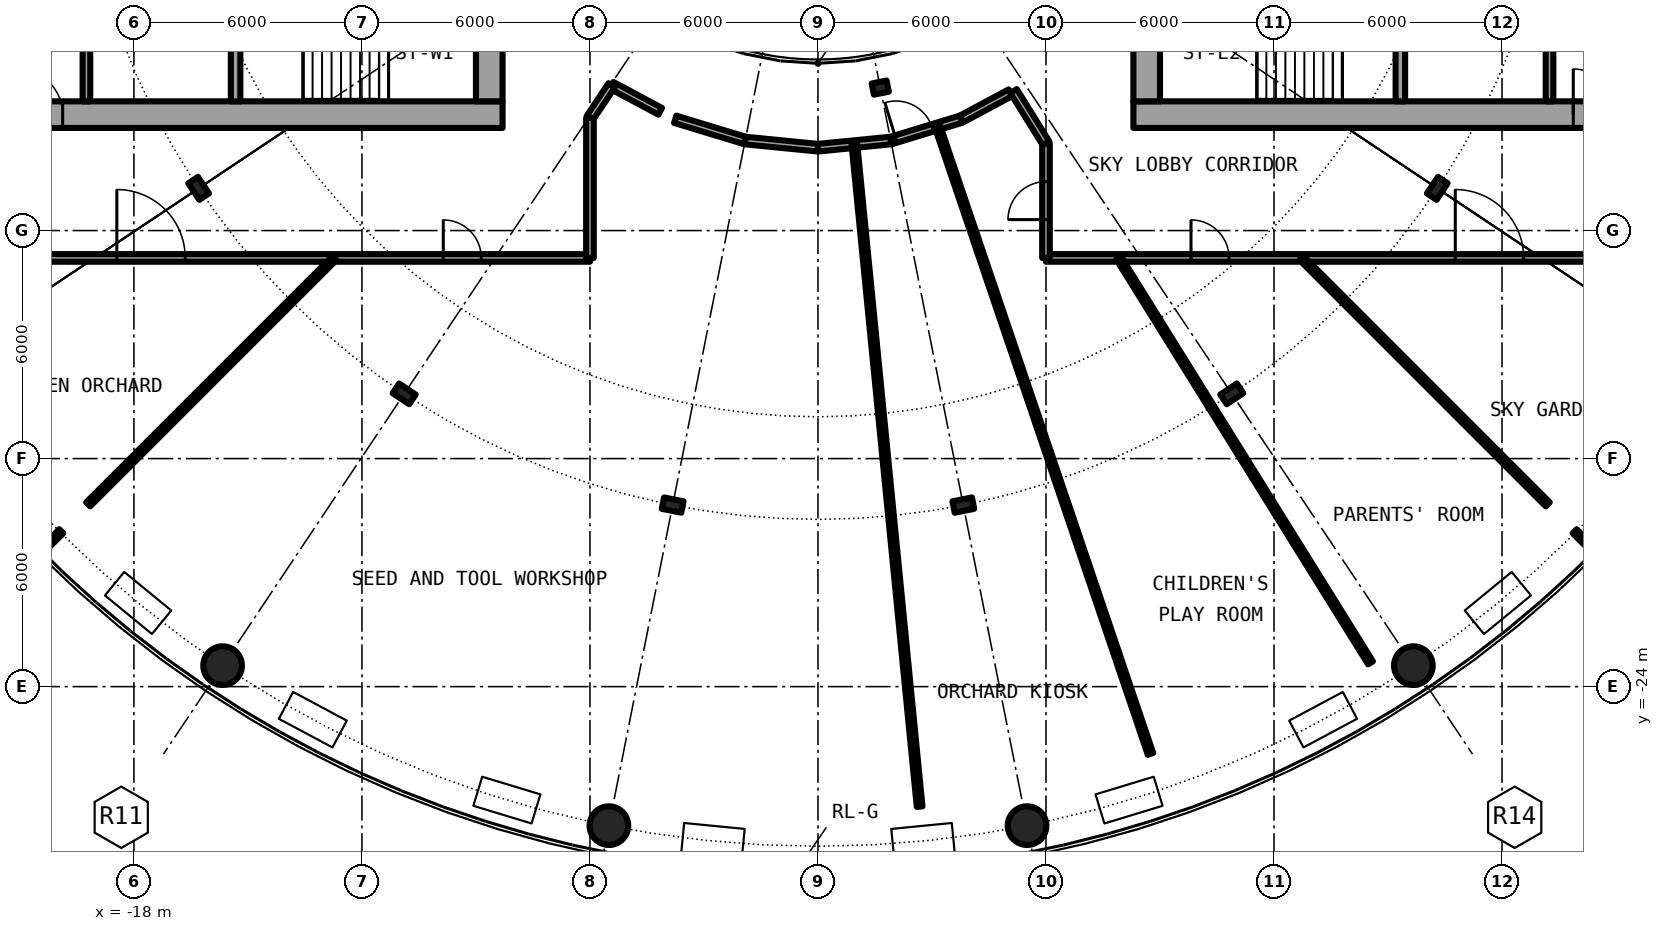
"""IFC4 building model, lengths in metres.
Left out: names, types, materials, properties, quantities, classifications, styles, units other than length and angle.
Written with IfcOpenShell. Run it as: python <this file> out.ifc"""

import sys

from ifc_helpers import new_model, si_unit, direction, frame, frame_2d, origin, origin_2d, place, context, subcontext, project, spatial, rectangle, hollow_circle, i_section, extrude, element, fill, save


model = new_model("IFC4")
c1 = context("Model", 3, precision=1e-05, world=origin(), true_north=direction((0.0, 1.0)))
c2 = subcontext(c1, "Body", "Model", "MODEL_VIEW")
j1 = project(units=[si_unit("LENGTHUNIT", "METRE"), si_unit("PLANEANGLEUNIT", "RADIAN")], contexts=[c1])
p1 = place(None, origin())
s1 = spatial("IfcSite", under=j1, at=p1, CompositionType="ELEMENT")
p2 = place(p1, origin())
s2 = spatial("IfcBuilding", under=s1, at=p2, CompositionType="ELEMENT")
p3 = place(p2, frame((0.0, 0.0, 97.15)))
s3 = spatial("IfcBuildingStorey", under=s2, at=p3, CompositionType="ELEMENT", Elevation=97.15)
for number, where, z_axis, x_axis in (
    (1, (-15.667, -23.448, 0.0), (0.0, 0.0, 1.0), (1.0, 0.0, 0.0)),
    (2, (-5.501, -27.658, 0.0), (0.0, 0.0, 1.0), (1.0, 0.0, 0.0)),
    (3, (5.501, -27.658, 0.0), (0.0, 0.0, 1.0), (1.0, 0.0, 0.0)),
    (4, (15.667, -23.448, 0.0), (0.0, 0.0, 1.0), (1.0, 0.0, 0.0)),
):
    element("IfcColumn", number, at=place(p3, frame(where, z_axis=z_axis, x_axis=x_axis)), inside=s3, PredefinedType="COLUMN", context=c2, shape_type="SweptSolid", body=[
        extrude(hollow_circle(Radius=0.508, WallThickness=0.04, at=origin_2d()), origin(), (0.0, 0.0, 1.0), 6.1),
    ])
for number, where, z_axis, x_axis in (
    (5, (-16.297, -10.889, 0.0), (0.0, 0.0, 1.0), (-0.831, -0.556, 0.0)),
    (6, (-10.889, -16.297, 0.0), (0.0, 0.0, 1.0), (-0.556, -0.831, 0.0)),
    (7, (-3.824, -19.223, 0.0), (0.0, 0.0, 1.0), (-0.195, -0.981, 0.0)),
    (8, (3.824, -19.223, 0.0), (0.0, 0.0, 1.0), (0.195, -0.981, 0.0)),
    (9, (10.889, -16.297, 0.0), (0.0, 0.0, 1.0), (0.556, -0.831, 0.0)),
    (10, (16.297, -10.889, 0.0), (0.0, 0.0, 1.0), (0.831, -0.556, 0.0)),
):
    element("IfcColumn", number, at=place(p3, frame(where, z_axis=z_axis, x_axis=x_axis)), inside=s3, PredefinedType="COLUMN", context=c2, shape_type="SweptSolid", body=[
        extrude(i_section(OverallWidth=0.306, OverallDepth=0.524, WebThickness=0.021, FlangeThickness=0.04, FilletRadius=0.027, at=origin_2d()), origin(), (0.0, 0.0, 1.0), 6.1),
    ])
p4 = place(p3, frame((1.639, -8.239, 0.0), z_axis=(0.0, 0.0, 1.0), x_axis=(0.195090322016, -0.980785280403, 0.0)))
e11 = element("IfcColumn", 11, at=p4, inside=s3, PredefinedType="COLUMN", context=c2, shape_type="SweptSolid", body=[
    extrude(i_section(OverallWidth=0.3, OverallDepth=0.4, WebThickness=0.013, FlangeThickness=0.024, FilletRadius=0.027, at=origin_2d()), origin(), (0.0, 0.0, 1.0), 6.1),
])
p5 = place(p3, frame((8.3, -8.95, 0.0), z_axis=(0.0, 0.0, 1.0), x_axis=(1.0, 0.0, 0.0)))
e12 = element("IfcWall", 12, at=p5, inside=s3, PredefinedType="SHEAR", context=c2, shape_type="SweptSolid", body=[
    extrude(rectangle(XDim=14.0, YDim=0.7, at=frame_2d((7.0, 0.0))), origin(), (0.0, 0.0, 1.0), 6.1),
])
p6 = place(p5, frame((11.575, 0.0, 0.0)))
e13 = element("IfcOpeningElement", 13, at=p6, cuts=e12, PredefinedType="OPENING", context=c2, shape_type="SweptSolid", body=[
    extrude(rectangle(XDim=1.2, YDim=2.3, at=frame_2d((0.6, 1.15))), frame((0.0, 0.36, 0.0), z_axis=(0.0, -1.0, 0.0), x_axis=(1.0, 0.0, 0.0)), (0.0, 0.0, 1.0), 0.72),
])
p7 = place(p3, frame((8.65, -8.6, 0.0), z_axis=(0.0, 0.0, 1.0), x_axis=(0.0, 1.0, 0.0)))
e14 = element("IfcWall", 14, at=p7, inside=s3, PredefinedType="SHEAR", context=c2, shape_type="SweptSolid", body=[
    extrude(rectangle(XDim=17.2, YDim=0.7, at=frame_2d((8.6, 0.0))), origin(), (0.0, 0.0, 1.0), 6.1),
])
p8 = place(p7, frame((7.4, 0.0, 0.1)))
e15 = element("IfcOpeningElement", 15, at=p8, cuts=e14, PredefinedType="OPENING", context=c2, shape_type="SweptSolid", body=[
    extrude(rectangle(XDim=2.4, YDim=2.2, at=frame_2d((1.2, 1.1))), frame((0.0, 0.36, 0.0), z_axis=(0.0, -1.0, 0.0), x_axis=(1.0, 0.0, 0.0)), (0.0, 0.0, 1.0), 0.72),
])
p9 = place(p3, frame((15.325, -8.6, 0.0), z_axis=(0.0, 0.0, 1.0), x_axis=(0.0, 1.0, 0.0)))
e16 = element("IfcWall", 16, at=p9, inside=s3, PredefinedType="SHEAR", context=c2, shape_type="SweptSolid", body=[
    extrude(rectangle(XDim=3.95, YDim=0.25, at=frame_2d((1.975, 0.0))), origin(), (0.0, 0.0, 1.0), 6.1),
])
p10 = place(p9, frame((2.025, 0.0, 0.0)))
e17 = element("IfcOpeningElement", 17, at=p10, cuts=e16, PredefinedType="OPENING", context=c2, shape_type="SweptSolid", body=[
    extrude(rectangle(XDim=1.2, YDim=2.3, at=frame_2d((0.6, 1.15))), frame((0.0, 0.135, 0.0), z_axis=(0.0, -1.0, 0.0), x_axis=(1.0, 0.0, 0.0)), (0.0, 0.0, 1.0), 0.27),
])
p11 = place(p3, frame((19.25, -8.6, 0.0), z_axis=(0.0, 0.0, 1.0), x_axis=(0.0, 1.0, 0.0)))
e18 = element("IfcWall", 18, at=p11, inside=s3, PredefinedType="SOLIDWALL", context=c2, shape_type="SweptSolid", body=[
    extrude(rectangle(XDim=7.025, YDim=0.2, at=frame_2d((3.513, 0.0))), origin(), (0.0, 0.0, 1.0), 5.7),
])
p12 = place(p11, frame((2.35, 0.0, 0.0)))
e19 = element("IfcOpeningElement", 19, at=p12, cuts=e18, PredefinedType="OPENING", context=c2, shape_type="SweptSolid", body=[
    extrude(rectangle(XDim=1.1, YDim=2.3, at=frame_2d((0.55, 1.15))), frame((0.0, 0.11, 0.0), z_axis=(0.0, -1.0, 0.0), x_axis=(1.0, 0.0, 0.0)), (0.0, 0.0, 1.0), 0.22),
])
p13 = place(p3, frame((-22.3, -8.95, 0.0), z_axis=(0.0, 0.0, 1.0), x_axis=(1.0, 0.0, 0.0)))
e20 = element("IfcWall", 20, at=p13, inside=s3, PredefinedType="SHEAR", context=c2, shape_type="SweptSolid", body=[
    extrude(rectangle(XDim=14.0, YDim=0.7, at=frame_2d((7.0, 0.0))), origin(), (0.0, 0.0, 1.0), 6.1),
])
p14 = place(p13, frame((1.225, 0.0, 0.0)))
e21 = element("IfcOpeningElement", 21, at=p14, cuts=e20, PredefinedType="OPENING", context=c2, shape_type="SweptSolid", body=[
    extrude(rectangle(XDim=1.2, YDim=2.3, at=frame_2d((0.6, 1.15))), frame((0.0, 0.36, 0.0), z_axis=(0.0, -1.0, 0.0), x_axis=(1.0, 0.0, 0.0)), (0.0, 0.0, 1.0), 0.72),
])
p15 = place(p3, frame((-8.65, 8.6, 0.0), z_axis=(0.0, 0.0, 1.0), x_axis=(0.0, -1.0, 0.0)))
e22 = element("IfcWall", 22, at=p15, inside=s3, PredefinedType="SHEAR", context=c2, shape_type="SweptSolid", body=[
    extrude(rectangle(XDim=17.2, YDim=0.7, at=frame_2d((8.6, 0.0))), origin(), (0.0, 0.0, 1.0), 6.1),
])
p16 = place(p15, frame((7.4, 0.0, 0.1)))
e23 = element("IfcOpeningElement", 23, at=p16, cuts=e22, PredefinedType="OPENING", context=c2, shape_type="SweptSolid", body=[
    extrude(rectangle(XDim=2.4, YDim=2.2, at=frame_2d((1.2, 1.1))), frame((0.0, 0.36, 0.0), z_axis=(0.0, -1.0, 0.0), x_axis=(1.0, 0.0, 0.0)), (0.0, 0.0, 1.0), 0.72),
])
p17 = place(p3, frame((-15.325, -4.65, 0.0), z_axis=(0.0, 0.0, 1.0), x_axis=(0.0, -1.0, 0.0)))
e24 = element("IfcWall", 24, at=p17, inside=s3, PredefinedType="SHEAR", context=c2, shape_type="SweptSolid", body=[
    extrude(rectangle(XDim=3.95, YDim=0.25, at=frame_2d((1.975, 0.0))), origin(), (0.0, 0.0, 1.0), 6.1),
])
p18 = place(p17, frame((1.375, 0.0, 0.0)))
e25 = element("IfcOpeningElement", 25, at=p18, cuts=e24, PredefinedType="OPENING", context=c2, shape_type="SweptSolid", body=[
    extrude(rectangle(XDim=1.2, YDim=2.3, at=frame_2d((0.6, 1.15))), frame((0.0, 0.135, 0.0), z_axis=(0.0, -1.0, 0.0), x_axis=(1.0, 0.0, 0.0)), (0.0, 0.0, 1.0), 0.27),
])
p19 = place(p3, frame((-19.25, -1.575, 0.0), z_axis=(0.0, 0.0, 1.0), x_axis=(0.0, -1.0, 0.0)))
e26 = element("IfcWall", 26, at=p19, inside=s3, PredefinedType="SOLIDWALL", context=c2, shape_type="SweptSolid", body=[
    extrude(rectangle(XDim=7.025, YDim=0.2, at=frame_2d((3.513, 0.0))), origin(), (0.0, 0.0, 1.0), 5.7),
])
p20 = place(p19, frame((4.475, 0.0, 0.0)))
e27 = element("IfcOpeningElement", 27, at=p20, cuts=e26, PredefinedType="OPENING", context=c2, shape_type="SweptSolid", body=[
    extrude(rectangle(XDim=1.1, YDim=2.3, at=frame_2d((0.55, 1.15))), frame((0.0, 0.11, 0.0), z_axis=(0.0, -1.0, 0.0), x_axis=(1.0, 0.0, 0.0)), (0.0, 0.0, 1.0), 0.22),
])
p21 = place(p3, frame((-21.9, -12.72, 0.0), z_axis=(0.0, 0.0, 1.0), x_axis=(1.0, 0.0, 0.0)))
e28 = element("IfcWall", 28, at=p21, inside=s3, PredefinedType="PARTITIONING", context=c2, shape_type="SweptSolid", body=[
    extrude(rectangle(XDim=15.9, YDim=0.2, at=frame_2d((7.95, 0.0))), origin(), (0.0, 0.0, 1.0), 5.7),
])
p22 = place(p21, frame((12.04, 0.0, 0.0)))
e29 = element("IfcOpeningElement", 29, at=p22, cuts=e28, PredefinedType="OPENING", context=c2, shape_type="SweptSolid", body=[
    extrude(rectangle(XDim=1.0, YDim=2.3, at=frame_2d((0.5, 1.15))), frame((0.0, 0.11, 0.0), z_axis=(0.0, -1.0, 0.0), x_axis=(1.0, 0.0, 0.0)), (0.0, 0.0, 1.0), 0.22),
])
p23 = place(p21, frame((3.45, 0.0, 0.0)))
e30 = element("IfcOpeningElement", 30, at=p23, cuts=e28, PredefinedType="OPENING", context=c2, shape_type="SweptSolid", body=[
    extrude(rectangle(XDim=1.8, YDim=2.3, at=frame_2d((0.9, 1.15))), frame((0.0, 0.11, 0.0), z_axis=(0.0, -1.0, 0.0), x_axis=(1.0, 0.0, 0.0)), (0.0, 0.0, 1.0), 0.22),
])
p24 = place(p3, frame((6.0, -12.72, 0.0), z_axis=(0.0, 0.0, 1.0), x_axis=(1.0, 0.0, 0.0)))
e31 = element("IfcWall", 31, at=p24, inside=s3, PredefinedType="PARTITIONING", context=c2, shape_type="SweptSolid", body=[
    extrude(rectangle(XDim=15.9, YDim=0.2, at=frame_2d((7.95, 0.0))), origin(), (0.0, 0.0, 1.0), 5.7),
])
p25 = place(p24, frame((3.816, 0.0, 0.0)))
e32 = element("IfcOpeningElement", 32, at=p25, cuts=e31, PredefinedType="OPENING", context=c2, shape_type="SweptSolid", body=[
    extrude(rectangle(XDim=1.0, YDim=2.3, at=frame_2d((0.5, 1.15))), frame((0.0, 0.11, 0.0), z_axis=(0.0, -1.0, 0.0), x_axis=(1.0, 0.0, 0.0)), (0.0, 0.0, 1.0), 0.22),
])
p26 = place(p24, frame((10.77, 0.0, 0.0)))
e33 = element("IfcOpeningElement", 33, at=p26, cuts=e31, PredefinedType="OPENING", context=c2, shape_type="SweptSolid", body=[
    extrude(rectangle(XDim=1.8, YDim=2.3, at=frame_2d((0.9, 1.15))), frame((0.0, 0.11, 0.0), z_axis=(0.0, -1.0, 0.0), x_axis=(1.0, 0.0, 0.0)), (0.0, 0.0, 1.0), 0.22),
])
p27 = place(p3, frame((-5.429, -8.179, 0.0), z_axis=(0.0, 0.0, 1.0), x_axis=(0.881652665802, -0.471898905364, 0.0)))
e34 = element("IfcWall", 34, at=p27, inside=s3, PredefinedType="PARTITIONING", context=c2, shape_type="SweptSolid", body=[
    extrude(rectangle(XDim=1.45, YDim=0.2, at=frame_2d((0.725, 0.0))), origin(), (0.0, 0.0, 1.0), 5.7),
])
p28 = place(p3, frame((-3.758, -9.072, 0.0), z_axis=(0.0, 0.0, 1.0), x_axis=(0.956896312675, -0.29042976223, 0.0)))
e35 = element("IfcWall", 35, at=p28, inside=s3, PredefinedType="PARTITIONING", context=c2, shape_type="SweptSolid", body=[
    extrude(rectangle(XDim=1.925, YDim=0.2, at=frame_2d((0.962, 0.0))), origin(), (0.0, 0.0, 1.0), 5.7),
])
for number, where, z_axis, x_axis in (
    (36, (-1.916, -9.631, 0.0), (0.0, 0.0, 1.0), (0.995, -0.098, 0.0)),
    (37, (0.0, -9.82, 0.0), (0.0, 0.0, 1.0), (0.995, 0.098, 0.0)),
):
    element("IfcWall", number, at=place(p3, frame(where, z_axis=z_axis, x_axis=x_axis)), inside=s3, PredefinedType="PARTITIONING", context=c2, shape_type="SweptSolid", body=[
        extrude(rectangle(XDim=1.925, YDim=0.2, at=frame_2d((0.963, 0.0))), origin(), (0.0, 0.0, 1.0), 5.7),
    ])
p29 = place(p3, frame((1.926, -9.63, 0.0), z_axis=(0.0, 0.0, 1.0), x_axis=(0.956606257688, 0.291383712228, 0.0)))
e38 = element("IfcWall", 38, at=p29, inside=s3, PredefinedType="PARTITIONING", context=c2, shape_type="SweptSolid", body=[
    extrude(rectangle(XDim=1.925, YDim=0.2, at=frame_2d((0.962, 0.0))), origin(), (0.0, 0.0, 1.0), 5.7),
])
p30 = place(p29, frame((0.132, 0.0, 0.0)))
e39 = element("IfcOpeningElement", 39, at=p30, cuts=e38, PredefinedType="OPENING", context=c2, shape_type="SweptSolid", body=[
    extrude(rectangle(XDim=1.0, YDim=2.3, at=frame_2d((0.5, 1.15))), frame((0.0, 0.11, 0.0), z_axis=(0.0, -1.0, 0.0), x_axis=(1.0, 0.0, 0.0)), (0.0, 0.0, 1.0), 0.22),
])
p31 = place(p3, frame((3.774, -9.066, 0.0), z_axis=(0.0, 0.0, 1.0), x_axis=(0.881271929501, 0.472609549494, 0.0)))
e40 = element("IfcWall", 40, at=p31, inside=s3, PredefinedType="PARTITIONING", context=c2, shape_type="SweptSolid", body=[
    extrude(rectangle(XDim=1.466, YDim=0.2, at=frame_2d((0.733, 0.0))), origin(), (0.0, 0.0, 1.0), 5.7),
])
p32 = place(p3, frame((6.0, -12.72, 0.0), z_axis=(0.0, 0.0, 1.0), x_axis=(0.0, 1.0, 0.0)))
e41 = element("IfcWall", 41, at=p32, inside=s3, PredefinedType="PARTITIONING", context=c2, shape_type="SweptSolid", body=[
    extrude(rectangle(XDim=3.017, YDim=0.2, at=frame_2d((1.509, 0.0))), origin(), (0.0, 0.0, 1.0), 5.7),
])
p33 = place(p32, frame((1.008, 0.0, 0.0)))
e42 = element("IfcOpeningElement", 42, at=p33, cuts=e41, PredefinedType="OPENING", context=c2, shape_type="SweptSolid", body=[
    extrude(rectangle(XDim=1.0, YDim=2.3, at=frame_2d((0.5, 1.15))), frame((0.0, 0.11, 0.0), z_axis=(0.0, -1.0, 0.0), x_axis=(1.0, 0.0, 0.0)), (0.0, 0.0, 1.0), 0.22),
])
p34 = place(p3, frame((-6.0, -9.034, 0.0), z_axis=(0.0, 0.0, 1.0), x_axis=(0.555412364489, 0.831575075007, 0.0)))
e43 = element("IfcWall", 43, at=p34, inside=s3, PredefinedType="PARTITIONING", context=c2, shape_type="SweptSolid", body=[
    extrude(rectangle(XDim=1.028, YDim=0.2, at=frame_2d((0.514, 0.0))), origin(), (0.0, 0.0, 1.0), 5.7),
])
p35 = place(p3, frame((5.147, -8.33, 0.0), z_axis=(0.0, 0.0, 1.0), x_axis=(0.527783933958, -0.849378666471, 0.0)))
e44 = element("IfcWall", 44, at=p35, inside=s3, PredefinedType="PARTITIONING", context=c2, shape_type="SweptSolid", body=[
    extrude(rectangle(XDim=1.616, YDim=0.2, at=frame_2d((0.808, 0.0))), origin(), (0.0, 0.0, 1.0), 5.7),
])
p36 = place(p3, frame((-20.365, -20.365, 0.0), z_axis=(0.0, 0.0, 1.0), x_axis=(0.707106781187, 0.707106781187, 0.0)))
e45 = element("IfcWall", 45, at=p36, inside=s3, PredefinedType="PARTITIONING", context=c2, shape_type="SweptSolid", body=[
    extrude(rectangle(XDim=0.642, YDim=0.15, at=frame_2d((0.321, 0.0))), origin(), (0.0, 0.0, 1.0), 5.7),
])
p37 = place(p3, frame((-19.204, -19.204, 0.0), z_axis=(0.0, 0.0, 1.0), x_axis=(0.707106781187, 0.707106781187, 0.0)))
e46 = element("IfcWall", 46, at=p37, inside=s3, PredefinedType="PARTITIONING", context=c2, shape_type="SweptSolid", body=[
    extrude(rectangle(XDim=9.17, YDim=0.15, at=frame_2d((4.585, 0.0))), origin(), (0.0, 0.0, 1.0), 5.7),
])
p38 = place(p3, frame((0.958, -9.726, 0.0), z_axis=(0.0, 0.0, 1.0), x_axis=(0.098025634079, -0.995183890074, 0.0)))
e47 = element("IfcWall", 47, at=p38, inside=s3, PredefinedType="PARTITIONING", context=c2, shape_type="SweptSolid", body=[
    extrude(rectangle(XDim=17.516, YDim=0.15, at=frame_2d((8.758, 0.0))), origin(), (0.0, 0.0, 1.0), 5.7),
])
p39 = place(p3, frame((3.144, -9.259, 0.0), z_axis=(0.0, 0.0, 1.0), x_axis=(0.321485791184, -0.946914402714, 0.0)))
e48 = element("IfcWall", 48, at=p39, inside=s3, PredefinedType="PARTITIONING", context=c2, shape_type="SweptSolid", body=[
    extrude(rectangle(XDim=17.438, YDim=0.15, at=frame_2d((8.719, 0.0))), origin(), (0.0, 0.0, 1.0), 5.7),
])
p40 = place(p3, frame((7.912, -12.72, 0.0), z_axis=(0.0, 0.0, 1.0), x_axis=(0.528173452455, -0.849136504999, 0.0)))
e49 = element("IfcWall", 49, at=p40, inside=s3, PredefinedType="PARTITIONING", context=c2, shape_type="SweptSolid", body=[
    extrude(rectangle(XDim=12.547, YDim=0.15, at=frame_2d((6.273, 0.0))), origin(), (0.0, 0.0, 1.0), 5.7),
])
p41 = place(p3, frame((12.72, -12.72, 0.0), z_axis=(0.0, 0.0, 1.0), x_axis=(0.707106781187, -0.707106781187, 0.0)))
e50 = element("IfcWall", 50, at=p41, inside=s3, PredefinedType="PARTITIONING", context=c2, shape_type="SweptSolid", body=[
    extrude(rectangle(XDim=9.17, YDim=0.15, at=frame_2d((4.585, 0.0))), origin(), (0.0, 0.0, 1.0), 5.7),
])
p42 = place(p3, frame((19.911, -19.911, 0.0), z_axis=(0.0, 0.0, 1.0), x_axis=(0.707106781187, -0.707106781187, 0.0)))
e51 = element("IfcWall", 51, at=p42, inside=s3, PredefinedType="PARTITIONING", context=c2, shape_type="SweptSolid", body=[
    extrude(rectangle(XDim=0.642, YDim=0.15, at=frame_2d((0.321, 0.0))), origin(), (0.0, 0.0, 1.0), 5.7),
])
p43 = place(p3, frame((-6.0, -12.72, 0.0), z_axis=(0.0, 0.0, 1.0), x_axis=(0.0, 1.0, 0.0)))
e52 = element("IfcWall", 52, at=p43, inside=s3, PredefinedType="PARTITIONING", context=c2, shape_type="SweptSolid", body=[
    extrude(rectangle(XDim=3.686, YDim=0.2, at=frame_2d((1.843, 0.0))), origin(), (0.0, 0.0, 1.0), 5.7),
])
p44 = place(p6, origin())
e53 = element("IfcDoor", 53, at=p44, inside=s3, OperationType="SINGLE_SWING_LEFT", PredefinedType="DOOR", context=c2, shape_type="SweptSolid", body=[
    extrude(rectangle(XDim=1.2, YDim=2.3, at=frame_2d((0.6, 1.15))), frame((0.0, 0.025, 0.0), z_axis=(0.0, -1.0, 0.0), x_axis=(1.0, 0.0, 0.0)), (0.0, 0.0, 1.0), 0.05),
])
fill(e13, e53)
p45 = place(p14, origin())
e54 = element("IfcDoor", 54, at=p45, inside=s3, OperationType="SINGLE_SWING_RIGHT", PredefinedType="DOOR", context=c2, shape_type="SweptSolid", body=[
    extrude(rectangle(XDim=1.2, YDim=2.3, at=frame_2d((0.6, 1.15))), frame((0.0, 0.025, 0.0), z_axis=(0.0, -1.0, 0.0), x_axis=(1.0, 0.0, 0.0)), (0.0, 0.0, 1.0), 0.05),
])
fill(e21, e54)
p46 = place(p22, origin())
e55 = element("IfcDoor", 55, at=p46, inside=s3, OperationType="SINGLE_SWING_RIGHT", PredefinedType="DOOR", context=c2, shape_type="SweptSolid", body=[
    extrude(rectangle(XDim=1.0, YDim=2.3, at=frame_2d((0.5, 1.15))), frame((0.0, 0.025, 0.0), z_axis=(0.0, -1.0, 0.0), x_axis=(1.0, 0.0, 0.0)), (0.0, 0.0, 1.0), 0.05),
])
fill(e29, e55)
p47 = place(p30, origin())
e56 = element("IfcDoor", 56, at=p47, inside=s3, OperationType="SINGLE_SWING_LEFT", PredefinedType="DOOR", context=c2, shape_type="SweptSolid", body=[
    extrude(rectangle(XDim=1.0, YDim=2.3, at=frame_2d((0.5, 1.15))), frame((0.0, 0.025, 0.0), z_axis=(0.0, -1.0, 0.0), x_axis=(1.0, 0.0, 0.0)), (0.0, 0.0, 1.0), 0.05),
])
fill(e39, e56)
p48 = place(p33, origin())
e57 = element("IfcDoor", 57, at=p48, inside=s3, OperationType="SINGLE_SWING_LEFT", PredefinedType="DOOR", context=c2, shape_type="SweptSolid", body=[
    extrude(rectangle(XDim=1.0, YDim=2.3, at=frame_2d((0.5, 1.15))), frame((0.0, 0.025, 0.0), z_axis=(0.0, -1.0, 0.0), x_axis=(1.0, 0.0, 0.0)), (0.0, 0.0, 1.0), 0.05),
])
fill(e42, e57)
p49 = place(p25, origin())
e58 = element("IfcDoor", 58, at=p49, inside=s3, OperationType="SINGLE_SWING_LEFT", PredefinedType="DOOR", context=c2, shape_type="SweptSolid", body=[
    extrude(rectangle(XDim=1.0, YDim=2.3, at=frame_2d((0.5, 1.15))), frame((0.0, 0.025, 0.0), z_axis=(0.0, -1.0, 0.0), x_axis=(1.0, 0.0, 0.0)), (0.0, 0.0, 1.0), 0.05),
])
fill(e32, e58)
p50 = place(p23, origin())
e59 = element("IfcDoor", 59, at=p50, inside=s3, OperationType="DOUBLE_DOOR_SINGLE_SWING", PredefinedType="DOOR", context=c2, shape_type="SweptSolid", body=[
    extrude(rectangle(XDim=1.8, YDim=2.3, at=frame_2d((0.9, 1.15))), frame((0.0, 0.025, 0.0), z_axis=(0.0, -1.0, 0.0), x_axis=(1.0, 0.0, 0.0)), (0.0, 0.0, 1.0), 0.05),
])
fill(e30, e59)
p51 = place(p26, origin())
e60 = element("IfcDoor", 60, at=p51, inside=s3, OperationType="DOUBLE_DOOR_SINGLE_SWING", PredefinedType="DOOR", context=c2, shape_type="SweptSolid", body=[
    extrude(rectangle(XDim=1.8, YDim=2.3, at=frame_2d((0.9, 1.15))), frame((0.0, 0.025, 0.0), z_axis=(0.0, -1.0, 0.0), x_axis=(1.0, 0.0, 0.0)), (0.0, 0.0, 1.0), 0.05),
])
fill(e33, e60)
save(model, sys.argv[1])
